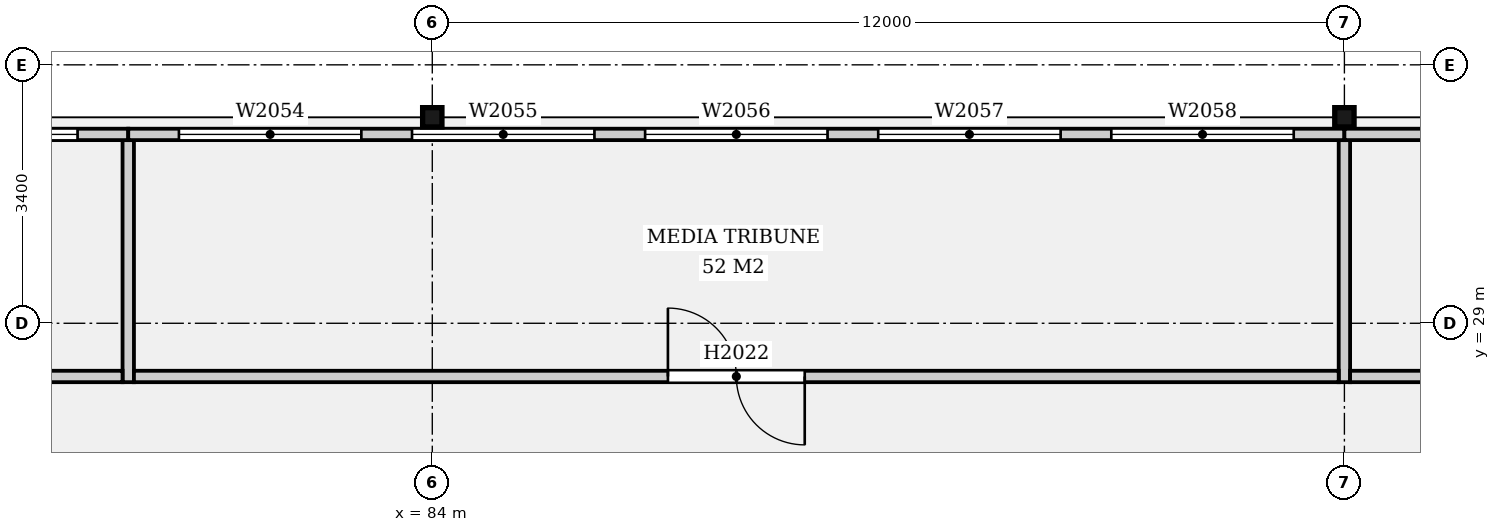
"""IFC4 building model, lengths in metres.
Left out: names, types, materials, properties, quantities, classifications, styles, units other than length and angle.
Written with IfcOpenShell. Run it as: python <this file> out.ifc"""

import sys

from ifc_helpers import new_model, si_unit, direction, frame, frame_2d, origin, origin_2d, place, context, subcontext, project, spatial, rectangle, hollow_rectangle, extrude, element, fill, save


model = new_model("IFC4")
c1 = context("Model", 3, precision=1e-05, world=origin(), true_north=direction((0.0, 1.0)))
c2 = subcontext(c1, "Body", "Model", "MODEL_VIEW")
j1 = project(units=[si_unit("LENGTHUNIT", "METRE"), si_unit("PLANEANGLEUNIT", "RADIAN")], contexts=[c1])
p1 = place(None, origin())
s1 = spatial("IfcSite", under=j1, at=p1, CompositionType="ELEMENT")
p2 = place(p1, origin())
s2 = spatial("IfcBuilding", under=s1, at=p2, CompositionType="ELEMENT")
p3 = place(p2, frame((0.0, 0.0, 9.4)))
s3 = spatial("IfcBuildingStorey", under=s2, at=p3, CompositionType="ELEMENT", Elevation=9.4)
for number, where, z_axis, x_axis in (
    (1, (84.0, 31.71, 0.0), (0.0, 0.0, 1.0), (1.0, 0.0, 0.0)),
    (2, (96.0, 31.71, 0.0), (0.0, 0.0, 1.0), (1.0, 0.0, 0.0)),
):
    element("IfcColumn", number, at=place(p3, frame(where, z_axis=z_axis, x_axis=x_axis)), inside=s3, PredefinedType="COLUMN", context=c2, shape_type="SweptSolid", body=[
        extrude(hollow_rectangle(XDim=0.254, YDim=0.254, WallThickness=0.016, InnerFilletRadius=0.008, OuterFilletRadius=0.024, at=origin_2d()), origin(), (0.0, 0.0, 1.0), 3.496),
    ])
p4 = place(p3, frame((64.0, 28.3, 0.0), z_axis=(0.0, 0.0, 1.0), x_axis=(1.0, 0.0, 0.0)))
e3 = element("IfcWall", 3, at=p4, inside=s3, PredefinedType="PARTITIONING", context=c2, shape_type="SweptSolid", body=[
    extrude(rectangle(XDim=15.925, YDim=0.15, at=frame_2d((7.962, 0.0))), origin(), (0.0, 0.0, 1.0), 3.496),
])
p5 = place(p4, frame((7.1, 0.0, 0.0)))
e4 = element("IfcOpeningElement", 4, at=p5, cuts=e3, PredefinedType="OPENING", context=c2, shape_type="SweptSolid", body=[
    extrude(rectangle(XDim=1.8, YDim=2.1, at=frame_2d((0.9, 1.05))), frame((0.0, 0.085, 0.0), z_axis=(0.0, -1.0, 0.0), x_axis=(1.0, 0.0, 0.0)), (0.0, 0.0, 1.0), 0.17),
])
p6 = place(p3, frame((80.0, 31.41, 0.0), z_axis=(0.0, 0.0, 1.0), x_axis=(0.0, -1.0, 0.0)))
e5 = element("IfcWall", 5, at=p6, inside=s3, PredefinedType="PARTITIONING", context=c2, shape_type="SweptSolid", body=[
    extrude(rectangle(XDim=3.185, YDim=0.15, at=frame_2d((1.592, 0.0))), origin(), (0.0, 0.0, 1.0), 4.15),
])
p7 = place(p3, frame((64.0, 31.485, 0.0), z_axis=(0.0, 0.0, 1.0), x_axis=(1.0, 0.0, 0.0)))
e6 = element("IfcWall", 6, at=p7, inside=s3, PredefinedType="PARTITIONING", context=c2, shape_type="SweptSolid", body=[
    extrude(rectangle(XDim=16.0, YDim=0.15, at=frame_2d((8.0, 0.0))), origin(), (0.0, 0.0, 1.0), 3.496),
])
p8 = place(p7, frame((0.667, 0.0, 1.0)))
e7 = element("IfcOpeningElement", 7, at=p8, cuts=e6, PredefinedType="OPENING", context=c2, shape_type="SweptSolid", body=[
    extrude(rectangle(XDim=2.4, YDim=1.5, at=frame_2d((1.2, 0.75))), frame((0.0, 0.085, 0.0), z_axis=(0.0, -1.0, 0.0), x_axis=(1.0, 0.0, 0.0)), (0.0, 0.0, 1.0), 0.17),
])
p9 = place(p7, frame((3.733, 0.0, 1.0)))
e8 = element("IfcOpeningElement", 8, at=p9, cuts=e6, PredefinedType="OPENING", context=c2, shape_type="SweptSolid", body=[
    extrude(rectangle(XDim=2.4, YDim=1.5, at=frame_2d((1.2, 0.75))), frame((0.0, 0.085, 0.0), z_axis=(0.0, -1.0, 0.0), x_axis=(1.0, 0.0, 0.0)), (0.0, 0.0, 1.0), 0.17),
])
p10 = place(p7, frame((6.8, 0.0, 1.0)))
e9 = element("IfcOpeningElement", 9, at=p10, cuts=e6, PredefinedType="OPENING", context=c2, shape_type="SweptSolid", body=[
    extrude(rectangle(XDim=2.4, YDim=1.5, at=frame_2d((1.2, 0.75))), frame((0.0, 0.085, 0.0), z_axis=(0.0, -1.0, 0.0), x_axis=(1.0, 0.0, 0.0)), (0.0, 0.0, 1.0), 0.17),
])
p11 = place(p7, frame((9.867, 0.0, 1.0)))
e10 = element("IfcOpeningElement", 10, at=p11, cuts=e6, PredefinedType="OPENING", context=c2, shape_type="SweptSolid", body=[
    extrude(rectangle(XDim=2.4, YDim=1.5, at=frame_2d((1.2, 0.75))), frame((0.0, 0.085, 0.0), z_axis=(0.0, -1.0, 0.0), x_axis=(1.0, 0.0, 0.0)), (0.0, 0.0, 1.0), 0.17),
])
p12 = place(p7, frame((12.933, 0.0, 1.0)))
e11 = element("IfcOpeningElement", 11, at=p12, cuts=e6, PredefinedType="OPENING", context=c2, shape_type="SweptSolid", body=[
    extrude(rectangle(XDim=2.4, YDim=1.5, at=frame_2d((1.2, 0.75))), frame((0.0, 0.085, 0.0), z_axis=(0.0, -1.0, 0.0), x_axis=(1.0, 0.0, 0.0)), (0.0, 0.0, 1.0), 0.17),
])
p13 = place(p3, frame((80.075, 28.3, 0.0), z_axis=(0.0, 0.0, 1.0), x_axis=(1.0, 0.0, 0.0)))
e12 = element("IfcWall", 12, at=p13, inside=s3, PredefinedType="PARTITIONING", context=c2, shape_type="SweptSolid", body=[
    extrude(rectangle(XDim=15.85, YDim=0.15, at=frame_2d((7.925, 0.0))), origin(), (0.0, 0.0, 1.0), 3.496),
])
p14 = place(p13, frame((7.025, 0.0, 0.0)))
e13 = element("IfcOpeningElement", 13, at=p14, cuts=e12, PredefinedType="OPENING", context=c2, shape_type="SweptSolid", body=[
    extrude(rectangle(XDim=1.8, YDim=2.1, at=frame_2d((0.9, 1.05))), frame((0.0, 0.085, 0.0), z_axis=(0.0, -1.0, 0.0), x_axis=(1.0, 0.0, 0.0)), (0.0, 0.0, 1.0), 0.17),
])
p15 = place(p3, frame((96.0, 31.41, 0.0), z_axis=(0.0, 0.0, 1.0), x_axis=(0.0, -1.0, 0.0)))
e14 = element("IfcWall", 14, at=p15, inside=s3, PredefinedType="PARTITIONING", context=c2, shape_type="SweptSolid", body=[
    extrude(rectangle(XDim=3.185, YDim=0.15, at=frame_2d((1.592, 0.0))), origin(), (0.0, 0.0, 1.0), 3.496),
])
p16 = place(p3, frame((80.0, 31.485, 0.0), z_axis=(0.0, 0.0, 1.0), x_axis=(1.0, 0.0, 0.0)))
e15 = element("IfcWall", 15, at=p16, inside=s3, PredefinedType="PARTITIONING", context=c2, shape_type="SweptSolid", body=[
    extrude(rectangle(XDim=16.0, YDim=0.15, at=frame_2d((8.0, 0.0))), origin(), (0.0, 0.0, 1.0), 3.496),
])
p17 = place(p16, frame((0.667, 0.0, 1.0)))
e16 = element("IfcOpeningElement", 16, at=p17, cuts=e15, PredefinedType="OPENING", context=c2, shape_type="SweptSolid", body=[
    extrude(rectangle(XDim=2.4, YDim=1.5, at=frame_2d((1.2, 0.75))), frame((0.0, 0.085, 0.0), z_axis=(0.0, -1.0, 0.0), x_axis=(1.0, 0.0, 0.0)), (0.0, 0.0, 1.0), 0.17),
])
p18 = place(p16, frame((3.733, 0.0, 1.0)))
e17 = element("IfcOpeningElement", 17, at=p18, cuts=e15, PredefinedType="OPENING", context=c2, shape_type="SweptSolid", body=[
    extrude(rectangle(XDim=2.4, YDim=1.5, at=frame_2d((1.2, 0.75))), frame((0.0, 0.085, 0.0), z_axis=(0.0, -1.0, 0.0), x_axis=(1.0, 0.0, 0.0)), (0.0, 0.0, 1.0), 0.17),
])
p19 = place(p16, frame((6.8, 0.0, 1.0)))
e18 = element("IfcOpeningElement", 18, at=p19, cuts=e15, PredefinedType="OPENING", context=c2, shape_type="SweptSolid", body=[
    extrude(rectangle(XDim=2.4, YDim=1.5, at=frame_2d((1.2, 0.75))), frame((0.0, 0.085, 0.0), z_axis=(0.0, -1.0, 0.0), x_axis=(1.0, 0.0, 0.0)), (0.0, 0.0, 1.0), 0.17),
])
p20 = place(p16, frame((9.867, 0.0, 1.0)))
e19 = element("IfcOpeningElement", 19, at=p20, cuts=e15, PredefinedType="OPENING", context=c2, shape_type="SweptSolid", body=[
    extrude(rectangle(XDim=2.4, YDim=1.5, at=frame_2d((1.2, 0.75))), frame((0.0, 0.085, 0.0), z_axis=(0.0, -1.0, 0.0), x_axis=(1.0, 0.0, 0.0)), (0.0, 0.0, 1.0), 0.17),
])
p21 = place(p16, frame((12.933, 0.0, 1.0)))
e20 = element("IfcOpeningElement", 20, at=p21, cuts=e15, PredefinedType="OPENING", context=c2, shape_type="SweptSolid", body=[
    extrude(rectangle(XDim=2.4, YDim=1.5, at=frame_2d((1.2, 0.75))), frame((0.0, 0.085, 0.0), z_axis=(0.0, -1.0, 0.0), x_axis=(1.0, 0.0, 0.0)), (0.0, 0.0, 1.0), 0.17),
])
p22 = place(p3, frame((96.075, 28.3, 0.0), z_axis=(0.0, 0.0, 1.0), x_axis=(1.0, 0.0, 0.0)))
e21 = element("IfcWall", 21, at=p22, inside=s3, PredefinedType="PARTITIONING", context=c2, shape_type="SweptSolid", body=[
    extrude(rectangle(XDim=7.85, YDim=0.15, at=frame_2d((3.925, 0.0))), origin(), (0.0, 0.0, 1.0), 3.496),
])
p23 = place(p22, frame((3.425, 0.0, 0.0)))
e22 = element("IfcOpeningElement", 22, at=p23, cuts=e21, PredefinedType="OPENING", context=c2, shape_type="SweptSolid", body=[
    extrude(rectangle(XDim=1.0, YDim=2.1, at=frame_2d((0.5, 1.05))), frame((0.0, 0.085, 0.0), z_axis=(0.0, -1.0, 0.0), x_axis=(1.0, 0.0, 0.0)), (0.0, 0.0, 1.0), 0.17),
])
p24 = place(p3, frame((96.0, 31.485, 0.0), z_axis=(0.0, 0.0, 1.0), x_axis=(1.0, 0.0, 0.0)))
e23 = element("IfcWall", 23, at=p24, inside=s3, PredefinedType="PARTITIONING", context=c2, shape_type="SweptSolid", body=[
    extrude(rectangle(XDim=8.0, YDim=0.15, at=frame_2d((4.0, 0.0))), origin(), (0.0, 0.0, 1.0), 3.496),
])
p25 = place(p24, frame((1.067, 0.0, 1.0)))
e24 = element("IfcOpeningElement", 24, at=p25, cuts=e23, PredefinedType="OPENING", context=c2, shape_type="SweptSolid", body=[
    extrude(rectangle(XDim=2.4, YDim=1.5, at=frame_2d((1.2, 0.75))), frame((0.0, 0.085, 0.0), z_axis=(0.0, -1.0, 0.0), x_axis=(1.0, 0.0, 0.0)), (0.0, 0.0, 1.0), 0.17),
])
p26 = place(p24, frame((4.533, 0.0, 1.0)))
e25 = element("IfcOpeningElement", 25, at=p26, cuts=e23, PredefinedType="OPENING", context=c2, shape_type="SweptSolid", body=[
    extrude(rectangle(XDim=2.4, YDim=1.5, at=frame_2d((1.2, 0.75))), frame((0.0, 0.085, 0.0), z_axis=(0.0, -1.0, 0.0), x_axis=(1.0, 0.0, 0.0)), (0.0, 0.0, 1.0), 0.17),
])
p27 = place(p12, origin())
e26 = element("IfcWindow", 26, at=p27, inside=s3, PartitioningType="SINGLE_PANEL", PredefinedType="WINDOW", context=c2, shape_type="SweptSolid", body=[
    extrude(rectangle(XDim=2.4, YDim=1.5, at=frame_2d((1.2, 0.75))), frame((0.0, 0.03, 0.0), z_axis=(0.0, -1.0, 0.0), x_axis=(1.0, 0.0, 0.0)), (0.0, 0.0, 1.0), 0.06),
])
fill(e11, e26)
p28 = place(p14, origin())
e27 = element("IfcDoor", 27, at=p28, inside=s3, OperationType="DOUBLE_DOOR_SINGLE_SWING", PredefinedType="DOOR", context=c2, shape_type="SweptSolid", body=[
    extrude(rectangle(XDim=1.8, YDim=2.1, at=frame_2d((0.9, 1.05))), frame((0.0, 0.025, 0.0), z_axis=(0.0, -1.0, 0.0), x_axis=(1.0, 0.0, 0.0)), (0.0, 0.0, 1.0), 0.05),
])
fill(e13, e27)
p29 = place(p17, origin())
e28 = element("IfcWindow", 28, at=p29, inside=s3, PartitioningType="SINGLE_PANEL", PredefinedType="WINDOW", context=c2, shape_type="SweptSolid", body=[
    extrude(rectangle(XDim=2.4, YDim=1.5, at=frame_2d((1.2, 0.75))), frame((0.0, 0.03, 0.0), z_axis=(0.0, -1.0, 0.0), x_axis=(1.0, 0.0, 0.0)), (0.0, 0.0, 1.0), 0.06),
])
fill(e16, e28)
p30 = place(p18, origin())
e29 = element("IfcWindow", 29, at=p30, inside=s3, PartitioningType="SINGLE_PANEL", PredefinedType="WINDOW", context=c2, shape_type="SweptSolid", body=[
    extrude(rectangle(XDim=2.4, YDim=1.5, at=frame_2d((1.2, 0.75))), frame((0.0, 0.03, 0.0), z_axis=(0.0, -1.0, 0.0), x_axis=(1.0, 0.0, 0.0)), (0.0, 0.0, 1.0), 0.06),
])
fill(e17, e29)
p31 = place(p19, origin())
e30 = element("IfcWindow", 30, at=p31, inside=s3, PartitioningType="SINGLE_PANEL", PredefinedType="WINDOW", context=c2, shape_type="SweptSolid", body=[
    extrude(rectangle(XDim=2.4, YDim=1.5, at=frame_2d((1.2, 0.75))), frame((0.0, 0.03, 0.0), z_axis=(0.0, -1.0, 0.0), x_axis=(1.0, 0.0, 0.0)), (0.0, 0.0, 1.0), 0.06),
])
fill(e18, e30)
p32 = place(p20, origin())
e31 = element("IfcWindow", 31, at=p32, inside=s3, PartitioningType="SINGLE_PANEL", PredefinedType="WINDOW", context=c2, shape_type="SweptSolid", body=[
    extrude(rectangle(XDim=2.4, YDim=1.5, at=frame_2d((1.2, 0.75))), frame((0.0, 0.03, 0.0), z_axis=(0.0, -1.0, 0.0), x_axis=(1.0, 0.0, 0.0)), (0.0, 0.0, 1.0), 0.06),
])
fill(e19, e31)
p33 = place(p21, origin())
e32 = element("IfcWindow", 32, at=p33, inside=s3, PartitioningType="SINGLE_PANEL", PredefinedType="WINDOW", context=c2, shape_type="SweptSolid", body=[
    extrude(rectangle(XDim=2.4, YDim=1.5, at=frame_2d((1.2, 0.75))), frame((0.0, 0.03, 0.0), z_axis=(0.0, -1.0, 0.0), x_axis=(1.0, 0.0, 0.0)), (0.0, 0.0, 1.0), 0.06),
])
fill(e20, e32)
save(model, sys.argv[1])
